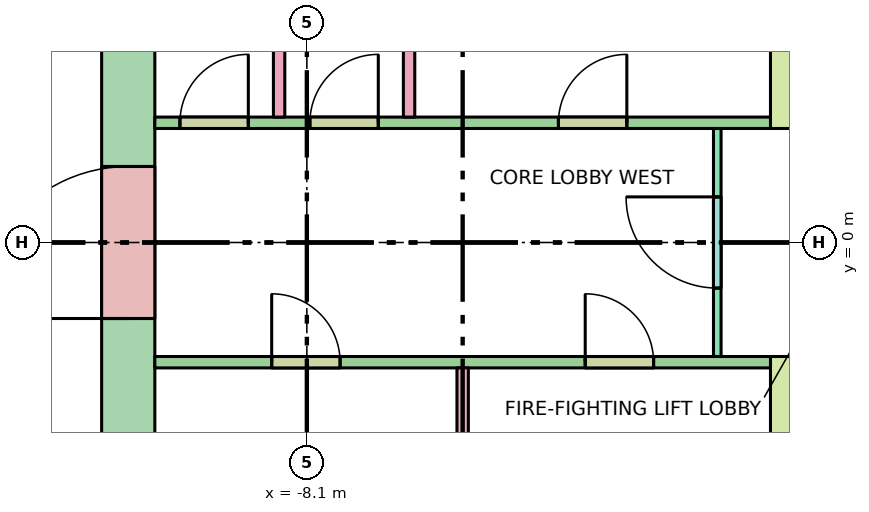
"""IFC4 building model, lengths in metres.
Left out: names, types, materials, properties, quantities, classifications, styles, units other than length and angle.
Written with IfcOpenShell. Run it as: python <this file> out.ifc"""

import sys

from ifc_helpers import new_model, si_unit, direction, frame, frame_2d, origin, place, context, subcontext, project, spatial, rectangle, extrude, element, fill, save


model = new_model("IFC4")
c1 = context("Model", 3, precision=1e-05, world=origin(), true_north=direction((0.0, 1.0)))
c2 = subcontext(c1, "Body", "Model", "MODEL_VIEW")
j1 = project(units=[si_unit("LENGTHUNIT", "METRE"), si_unit("PLANEANGLEUNIT", "RADIAN")], contexts=[c1])
p1 = place(None, origin())
s1 = spatial("IfcSite", under=j1, at=p1, CompositionType="ELEMENT")
p2 = place(p1, origin())
s2 = spatial("IfcBuilding", under=s1, at=p2, CompositionType="ELEMENT")
p3 = place(p2, frame((0.0, 0.0, 203.9)))
s3 = spatial("IfcBuildingStorey", under=s2, at=p3, CompositionType="ELEMENT", Elevation=203.9)
p4 = place(p3, frame((-10.45, -5.13, -0.28), z_axis=(0.0, 0.0, 1.0), x_axis=(0.0, 1.0, 0.0)))
e1 = element("IfcWall", 1, at=p4, inside=s3, PredefinedType="SHEAR", context=c2, shape_type="SweptSolid", body=[
    extrude(rectangle(XDim=10.26, YDim=0.7, at=frame_2d((5.13, 0.0))), origin(), (0.0, 0.0, 1.0), 3.7),
])
p5 = place(p4, frame((4.13, 0.0, 0.28)))
e2 = element("IfcOpeningElement", 2, at=p5, cuts=e1, PredefinedType="OPENING", context=c2, shape_type="SweptSolid", body=[
    extrude(rectangle(XDim=2.0, YDim=2.1, at=frame_2d((1.0, 1.05))), frame((0.0, 0.36, 0.0), z_axis=(0.0, -1.0, 0.0), x_axis=(1.0, 0.0, 0.0)), (0.0, 0.0, 1.0), 0.72),
])
for number, where, z_axis, x_axis in (
    (3, (-1.85, 1.5, 0.0), (0.0, 0.0, 1.0), (0.0, 1.0, 0.0)),
    (4, (-1.85, -8.1, 0.0), (0.0, 0.0, 1.0), (0.0, 1.0, 0.0)),
):
    element("IfcWall", number, at=place(p3, frame(where, z_axis=z_axis, x_axis=x_axis)), inside=s3, PredefinedType="SHEAR", context=c2, shape_type="SweptSolid", body=[
        extrude(rectangle(XDim=6.6, YDim=0.3, at=frame_2d((3.3, 0.0))), origin(), (0.0, 0.0, 1.0), 3.42),
    ])
p6 = place(p3, frame((-2.7, -1.5, 0.0), z_axis=(0.0, 0.0, 1.0), x_axis=(0.0, 1.0, 0.0)))
e5 = element("IfcWall", 5, at=p6, inside=s3, PredefinedType="PARTITIONING", context=c2, shape_type="SweptSolid", body=[
    extrude(rectangle(XDim=3.0, YDim=0.1, at=frame_2d((1.5, 0.0))), origin(), (0.0, 0.0, 1.0), 3.42),
])
p7 = place(p6, frame((0.9, 0.0, 0.0)))
e6 = element("IfcOpeningElement", 6, at=p7, cuts=e5, PredefinedType="OPENING", context=c2, shape_type="SweptSolid", body=[
    extrude(rectangle(XDim=1.2, YDim=2.1, at=frame_2d((0.6, 1.05))), frame((0.0, 0.06, 0.0), z_axis=(0.0, -1.0, 0.0), x_axis=(1.0, 0.0, 0.0)), (0.0, 0.0, 1.0), 0.12),
])
for number, where, z_axis, x_axis in (
    (7, (-8.465, 1.65, 0.0), (0.0, 0.0, 1.0), (0.0, 1.0, 0.0)),
    (8, (-6.755, 1.65, 0.0), (0.0, 0.0, 1.0), (0.0, 1.0, 0.0)),
    (9, (-6.05, -4.2, 0.0), (0.0, 0.0, 1.0), (0.0, 1.0, 0.0)),
):
    element("IfcWall", number, at=place(p3, frame(where, z_axis=z_axis, x_axis=x_axis)), inside=s3, PredefinedType="PARTITIONING", context=c2, shape_type="SweptSolid", body=[
        extrude(rectangle(XDim=2.55, YDim=0.15, at=frame_2d((1.275, 0.0))), origin(), (0.0, 0.0, 1.0), 3.42),
    ])
p8 = place(p3, frame((-10.1, 1.575, 0.0), z_axis=(0.0, 0.0, 1.0), x_axis=(1.0, 0.0, 0.0)))
e10 = element("IfcWall", 10, at=p8, inside=s3, PredefinedType="PARTITIONING", context=c2, shape_type="SweptSolid", body=[
    extrude(rectangle(XDim=8.1, YDim=0.15, at=frame_2d((4.05, 0.0))), origin(), (0.0, 0.0, 1.0), 3.42),
])
p9 = place(p8, frame((0.33, 0.0, 0.0)))
e11 = element("IfcOpeningElement", 11, at=p9, cuts=e10, PredefinedType="OPENING", context=c2, shape_type="SweptSolid", body=[
    extrude(rectangle(XDim=0.9, YDim=2.1, at=frame_2d((0.45, 1.05))), frame((0.0, 0.085, 0.0), z_axis=(0.0, -1.0, 0.0), x_axis=(1.0, 0.0, 0.0)), (0.0, 0.0, 1.0), 0.17),
])
p10 = place(p8, frame((2.04, 0.0, 0.0)))
e12 = element("IfcOpeningElement", 12, at=p10, cuts=e10, PredefinedType="OPENING", context=c2, shape_type="SweptSolid", body=[
    extrude(rectangle(XDim=0.9, YDim=2.1, at=frame_2d((0.45, 1.05))), frame((0.0, 0.085, 0.0), z_axis=(0.0, -1.0, 0.0), x_axis=(1.0, 0.0, 0.0)), (0.0, 0.0, 1.0), 0.17),
])
p11 = place(p8, frame((5.31, 0.0, 0.0)))
e13 = element("IfcOpeningElement", 13, at=p11, cuts=e10, PredefinedType="OPENING", context=c2, shape_type="SweptSolid", body=[
    extrude(rectangle(XDim=0.9, YDim=2.1, at=frame_2d((0.45, 1.05))), frame((0.0, 0.085, 0.0), z_axis=(0.0, -1.0, 0.0), x_axis=(1.0, 0.0, 0.0)), (0.0, 0.0, 1.0), 0.17),
])
p12 = place(p3, frame((-10.1, -1.575, 0.0), z_axis=(0.0, 0.0, 1.0), x_axis=(1.0, 0.0, 0.0)))
e14 = element("IfcWall", 14, at=p12, inside=s3, PredefinedType="PARTITIONING", context=c2, shape_type="SweptSolid", body=[
    extrude(rectangle(XDim=8.1, YDim=0.15, at=frame_2d((4.05, 0.0))), origin(), (0.0, 0.0, 1.0), 3.42),
])
p13 = place(p12, frame((1.538, 0.0, 0.0)))
e15 = element("IfcOpeningElement", 15, at=p13, cuts=e14, PredefinedType="OPENING", context=c2, shape_type="SweptSolid", body=[
    extrude(rectangle(XDim=0.9, YDim=2.1, at=frame_2d((0.45, 1.05))), frame((0.0, 0.085, 0.0), z_axis=(0.0, -1.0, 0.0), x_axis=(1.0, 0.0, 0.0)), (0.0, 0.0, 1.0), 0.17),
])
p14 = place(p12, frame((5.663, 0.0, 0.0)))
e16 = element("IfcOpeningElement", 16, at=p14, cuts=e14, PredefinedType="OPENING", context=c2, shape_type="SweptSolid", body=[
    extrude(rectangle(XDim=0.9, YDim=2.1, at=frame_2d((0.45, 1.05))), frame((0.0, 0.085, 0.0), z_axis=(0.0, -1.0, 0.0), x_axis=(1.0, 0.0, 0.0)), (0.0, 0.0, 1.0), 0.17),
])
p15 = place(p5, origin())
e17 = element("IfcDoor", 17, at=p15, inside=s3, OperationType="DOUBLE_DOOR_SINGLE_SWING", PredefinedType="DOOR", context=c2, shape_type="SweptSolid", body=[
    extrude(rectangle(XDim=2.0, YDim=2.1, at=frame_2d((1.0, 1.05))), frame((0.0, 0.025, 0.0), z_axis=(0.0, -1.0, 0.0), x_axis=(1.0, 0.0, 0.0)), (0.0, 0.0, 1.0), 0.05),
])
fill(e2, e17)
p16 = place(p7, origin())
e18 = element("IfcDoor", 18, at=p16, inside=s3, OperationType="SINGLE_SWING_RIGHT", PredefinedType="DOOR", context=c2, shape_type="SweptSolid", body=[
    extrude(rectangle(XDim=1.2, YDim=2.1, at=frame_2d((0.6, 1.05))), frame((0.0, 0.025, 0.0), z_axis=(0.0, -1.0, 0.0), x_axis=(1.0, 0.0, 0.0)), (0.0, 0.0, 1.0), 0.05),
])
fill(e6, e18)
p17 = place(p9, origin())
e19 = element("IfcDoor", 19, at=p17, inside=s3, OperationType="SINGLE_SWING_RIGHT", PredefinedType="DOOR", context=c2, shape_type="SweptSolid", body=[
    extrude(rectangle(XDim=0.9, YDim=2.1, at=frame_2d((0.45, 1.05))), frame((0.0, 0.025, 0.0), z_axis=(0.0, -1.0, 0.0), x_axis=(1.0, 0.0, 0.0)), (0.0, 0.0, 1.0), 0.05),
])
fill(e11, e19)
p18 = place(p10, origin())
e20 = element("IfcDoor", 20, at=p18, inside=s3, OperationType="SINGLE_SWING_RIGHT", PredefinedType="DOOR", context=c2, shape_type="SweptSolid", body=[
    extrude(rectangle(XDim=0.9, YDim=2.1, at=frame_2d((0.45, 1.05))), frame((0.0, 0.025, 0.0), z_axis=(0.0, -1.0, 0.0), x_axis=(1.0, 0.0, 0.0)), (0.0, 0.0, 1.0), 0.05),
])
fill(e12, e20)
p19 = place(p11, origin())
e21 = element("IfcDoor", 21, at=p19, inside=s3, OperationType="SINGLE_SWING_RIGHT", PredefinedType="DOOR", context=c2, shape_type="SweptSolid", body=[
    extrude(rectangle(XDim=0.9, YDim=2.1, at=frame_2d((0.45, 1.05))), frame((0.0, 0.025, 0.0), z_axis=(0.0, -1.0, 0.0), x_axis=(1.0, 0.0, 0.0)), (0.0, 0.0, 1.0), 0.05),
])
fill(e13, e21)
p20 = place(p13, origin())
e22 = element("IfcDoor", 22, at=p20, inside=s3, OperationType="SINGLE_SWING_LEFT", PredefinedType="DOOR", context=c2, shape_type="SweptSolid", body=[
    extrude(rectangle(XDim=0.9, YDim=2.1, at=frame_2d((0.45, 1.05))), frame((0.0, 0.025, 0.0), z_axis=(0.0, -1.0, 0.0), x_axis=(1.0, 0.0, 0.0)), (0.0, 0.0, 1.0), 0.05),
])
fill(e15, e22)
p21 = place(p14, origin())
e23 = element("IfcDoor", 23, at=p21, inside=s3, OperationType="SINGLE_SWING_LEFT", PredefinedType="DOOR", context=c2, shape_type="SweptSolid", body=[
    extrude(rectangle(XDim=0.9, YDim=2.1, at=frame_2d((0.45, 1.05))), frame((0.0, 0.025, 0.0), z_axis=(0.0, -1.0, 0.0), x_axis=(1.0, 0.0, 0.0)), (0.0, 0.0, 1.0), 0.05),
])
fill(e16, e23)
save(model, sys.argv[1])
